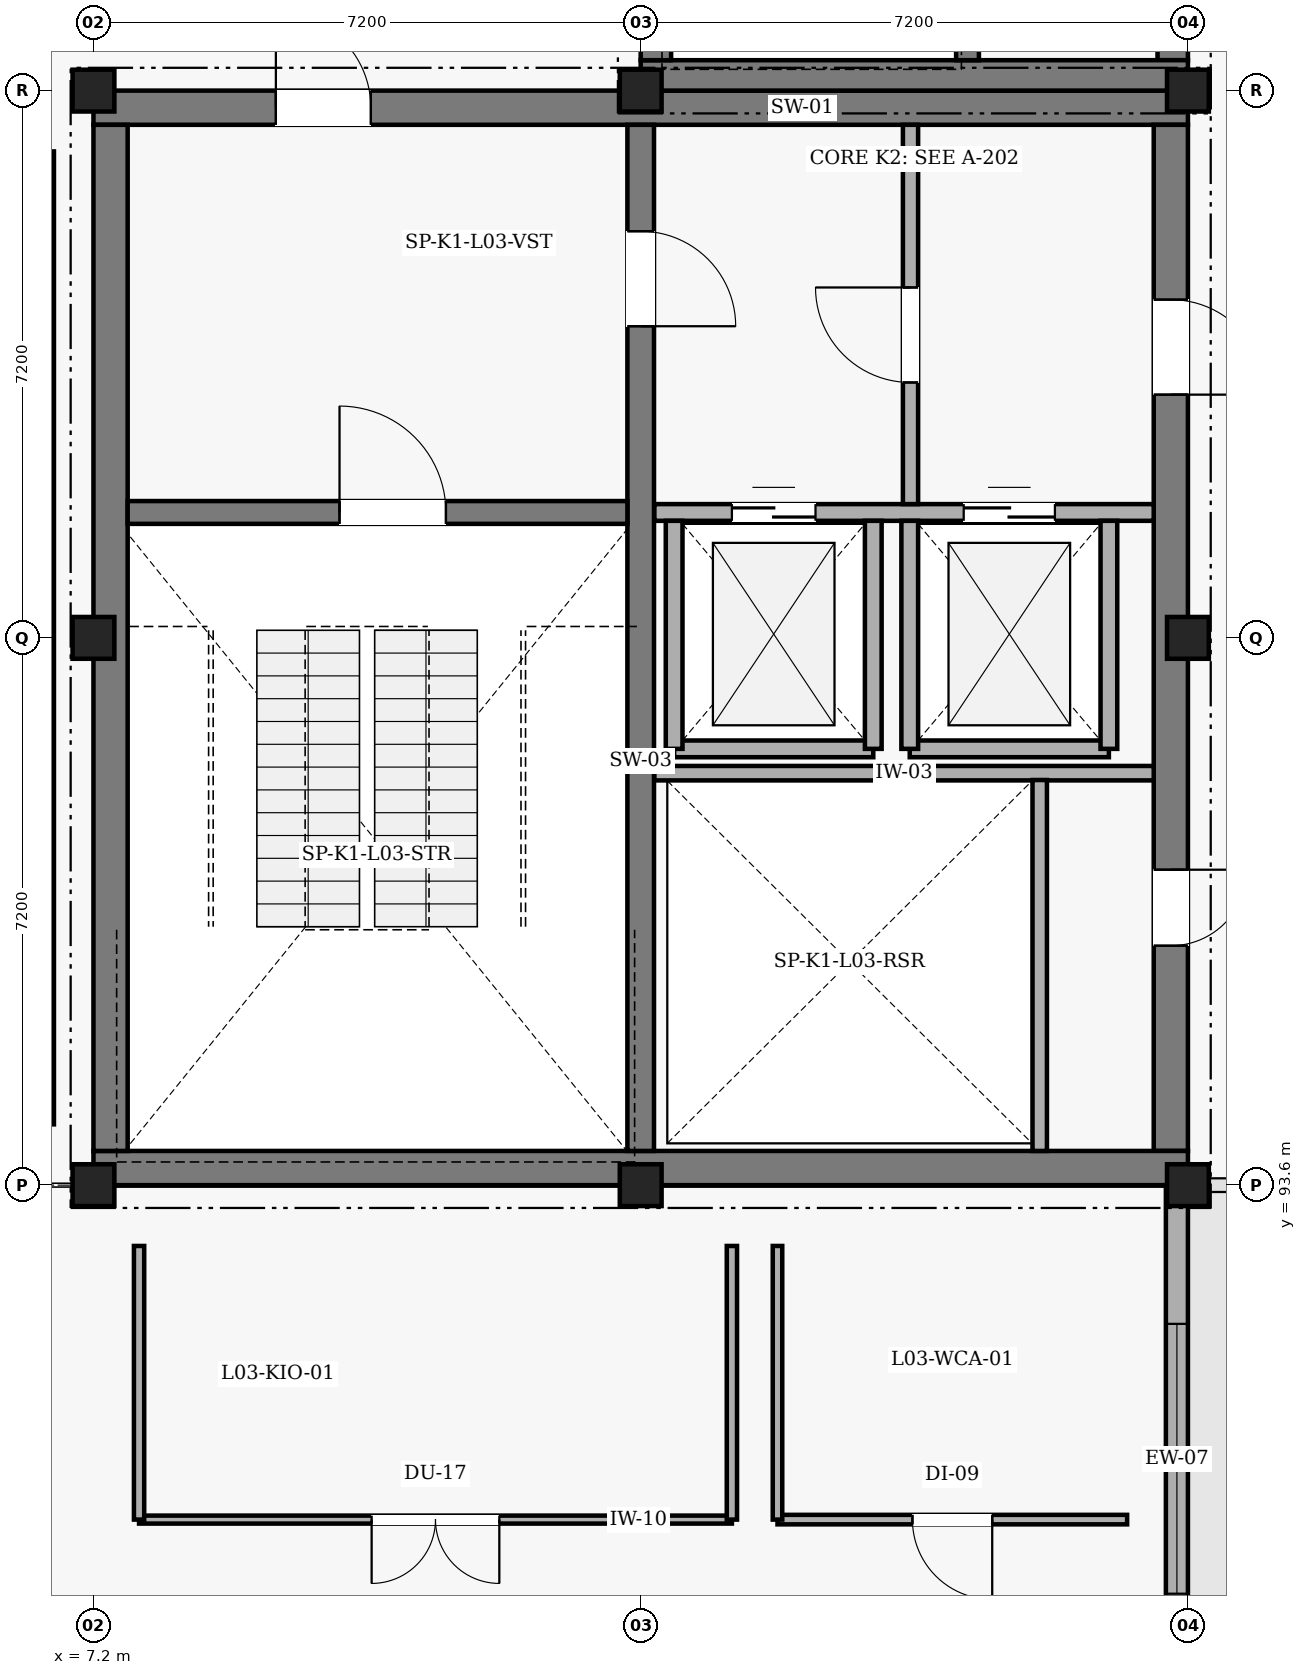
"""IFC4 building model, lengths in metres.
Left out: names, types, materials, properties, quantities, classifications, styles, units other than length and angle.
Written with IfcOpenShell. Run it as: python <this file> out.ifc"""

import sys

from ifc_helpers import new_model, si_unit, direction, frame, frame_2d, origin, origin_2d, place, context, subcontext, project, spatial, rectangle, extrude, element, fill, save


model = new_model("IFC4")
c1 = context("Model", 3, precision=1e-05, world=origin(), true_north=direction((0.0, 1.0)))
c2 = subcontext(c1, "Body", "Model", "MODEL_VIEW")
j1 = project(units=[si_unit("LENGTHUNIT", "METRE"), si_unit("PLANEANGLEUNIT", "RADIAN")], contexts=[c1])
p1 = place(None, origin())
s1 = spatial("IfcSite", under=j1, at=p1, CompositionType="ELEMENT")
p2 = place(p1, origin())
s2 = spatial("IfcBuilding", under=s1, at=p2, CompositionType="ELEMENT")
p3 = place(p2, frame((0.0, 0.0, 13.8)))
s3 = spatial("IfcBuildingStorey", under=s2, at=p3, CompositionType="ELEMENT", Elevation=13.8)
p4 = place(p3, frame((7.2, 107.775, 0.0), z_axis=(0.0, 0.0, 1.0), x_axis=(1.0, 0.0, 0.0)))
e1 = element("IfcWall", 1, at=p4, inside=s3, PredefinedType="SHEAR", context=c2, shape_type="SweptSolid", body=[
    extrude(rectangle(XDim=14.4, YDim=0.45, at=frame_2d((7.2, 0.0))), origin(), (0.0, 0.0, 1.0), 4.2),
])
p5 = place(p4, frame((2.4, 0.0, 0.0)))
e2 = element("IfcOpeningElement", 2, at=p5, cuts=e1, PredefinedType="OPENING", context=c2, shape_type="SweptSolid", body=[
    extrude(rectangle(XDim=1.25, YDim=2.2, at=frame_2d((0.625, 1.1))), frame((0.0, 0.235, 0.0), z_axis=(0.0, -1.0, 0.0), x_axis=(1.0, 0.0, 0.0)), (0.0, 0.0, 1.0), 0.47),
])
p6 = place(p3, frame((21.375, 107.55, 0.0), z_axis=(0.0, 0.0, 1.0), x_axis=(0.0, -1.0, 0.0)))
e3 = element("IfcWall", 3, at=p6, inside=s3, PredefinedType="SHEAR", context=c2, shape_type="SweptSolid", body=[
    extrude(rectangle(XDim=13.5, YDim=0.45, at=frame_2d((6.75, 0.0))), origin(), (0.0, 0.0, 1.0), 4.2),
])
p7 = place(p6, frame((9.8, 0.0, 0.0)))
e4 = element("IfcOpeningElement", 4, at=p7, cuts=e3, PredefinedType="OPENING", context=c2, shape_type="SweptSolid", body=[
    extrude(rectangle(XDim=1.0, YDim=2.15, at=frame_2d((0.5, 1.075))), frame((0.0, 0.235, 0.0), z_axis=(0.0, -1.0, 0.0), x_axis=(1.0, 0.0, 0.0)), (0.0, 0.0, 1.0), 0.47),
])
p8 = place(p6, frame((2.3, 0.0, 0.0)))
e5 = element("IfcOpeningElement", 5, at=p8, cuts=e3, PredefinedType="OPENING", context=c2, shape_type="SweptSolid", body=[
    extrude(rectangle(XDim=1.25, YDim=2.2, at=frame_2d((0.625, 1.1))), frame((0.0, 0.235, 0.0), z_axis=(0.0, -1.0, 0.0), x_axis=(1.0, 0.0, 0.0)), (0.0, 0.0, 1.0), 0.47),
])
p9 = place(p3, frame((21.6, 93.825, 0.0), z_axis=(0.0, 0.0, 1.0), x_axis=(-1.0, 0.0, 0.0)))
e6 = element("IfcWall", 6, at=p9, inside=s3, PredefinedType="SHEAR", context=c2, shape_type="SweptSolid", body=[
    extrude(rectangle(XDim=14.4, YDim=0.45, at=frame_2d((7.2, 0.0))), origin(), (0.0, 0.0, 1.0), 4.2),
])
p10 = place(p3, frame((7.425, 94.05, 0.0), z_axis=(0.0, 0.0, 1.0), x_axis=(0.0, 1.0, 0.0)))
e7 = element("IfcWall", 7, at=p10, inside=s3, PredefinedType="SHEAR", context=c2, shape_type="SweptSolid", body=[
    extrude(rectangle(XDim=13.5, YDim=0.45, at=frame_2d((6.75, 0.0))), origin(), (0.0, 0.0, 1.0), 4.2),
])
p11 = place(p3, frame((14.4, 107.55, 0.0), z_axis=(0.0, 0.0, 1.0), x_axis=(0.0, -1.0, 0.0)))
e8 = element("IfcWall", 8, at=p11, inside=s3, PredefinedType="SHEAR", context=c2, shape_type="SweptSolid", body=[
    extrude(rectangle(XDim=13.5, YDim=0.35, at=frame_2d((6.75, 0.0))), origin(), (0.0, 0.0, 1.0), 4.2),
])
p12 = place(p11, frame((1.4, 0.0, 0.0)))
e9 = element("IfcOpeningElement", 9, at=p12, cuts=e8, PredefinedType="OPENING", context=c2, shape_type="SweptSolid", body=[
    extrude(rectangle(XDim=1.25, YDim=2.2, at=frame_2d((0.625, 1.1))), frame((0.0, 0.185, 0.0), z_axis=(0.0, -1.0, 0.0), x_axis=(1.0, 0.0, 0.0)), (0.0, 0.0, 1.0), 0.37),
])
p13 = place(p3, frame((7.65, 102.45, 0.0), z_axis=(0.0, 0.0, 1.0), x_axis=(1.0, 0.0, 0.0)))
e10 = element("IfcWall", 10, at=p13, inside=s3, PredefinedType="SHEAR", context=c2, shape_type="SweptSolid", body=[
    extrude(rectangle(XDim=6.575, YDim=0.3, at=frame_2d((3.288, 0.0))), origin(), (0.0, 0.0, 1.0), 4.2),
])
p14 = place(p13, frame((2.788, 0.0, 0.0)))
e11 = element("IfcOpeningElement", 11, at=p14, cuts=e10, PredefinedType="OPENING", context=c2, shape_type="SweptSolid", body=[
    extrude(rectangle(XDim=1.4, YDim=2.2, at=frame_2d((0.7, 1.1))), frame((0.0, 0.16, 0.0), z_axis=(0.0, -1.0, 0.0), x_axis=(1.0, 0.0, 0.0)), (0.0, 0.0, 1.0), 0.32),
])
p15 = place(p3, frame((21.4, 122.0, 0.0), z_axis=(0.0, 0.0, 1.0), x_axis=(0.0, -1.0, 0.0)))
e12 = element("IfcWall", 12, at=p15, inside=s3, PredefinedType="SHEAR", context=c2, shape_type="SweptSolid", body=[
    extrude(rectangle(XDim=13.6, YDim=0.4, at=frame_2d((6.8, 0.0))), origin(), (0.0, 0.0, 1.0), 4.2),
])
p16 = place(p15, frame((2.3, 0.0, 0.0)))
e13 = element("IfcOpeningElement", 13, at=p16, cuts=e12, PredefinedType="OPENING", context=c2, shape_type="SweptSolid", body=[
    extrude(rectangle(XDim=1.25, YDim=2.2, at=frame_2d((0.625, 1.1))), frame((0.0, 0.21, 0.0), z_axis=(0.0, -1.0, 0.0), x_axis=(1.0, 0.0, 0.0)), (0.0, 0.0, 1.0), 0.42),
])
p17 = place(p3, frame((21.6, 108.2, 0.0), z_axis=(0.0, 0.0, 1.0), x_axis=(-1.0, 0.0, 0.0)))
e14 = element("IfcWall", 14, at=p17, inside=s3, PredefinedType="SHEAR", context=c2, shape_type="SweptSolid", body=[
    extrude(rectangle(XDim=7.2, YDim=0.4, at=frame_2d((3.6, 0.0))), origin(), (0.0, 0.0, 1.0), 4.2),
])
p18 = place(p3, frame((14.6, 108.4, 0.0), z_axis=(0.0, 0.0, 1.0), x_axis=(0.0, 1.0, 0.0)))
e15 = element("IfcWall", 15, at=p18, inside=s3, PredefinedType="SHEAR", context=c2, shape_type="SweptSolid", body=[
    extrude(rectangle(XDim=13.6, YDim=0.4, at=frame_2d((6.8, 0.0))), origin(), (0.0, 0.0, 1.0), 4.2),
])
p19 = place(p18, frame((9.8, 0.0, 0.0)))
e16 = element("IfcOpeningElement", 16, at=p19, cuts=e15, PredefinedType="OPENING", context=c2, shape_type="SweptSolid", body=[
    extrude(rectangle(XDim=1.25, YDim=2.2, at=frame_2d((0.625, 1.1))), frame((0.0, 0.21, 0.0), z_axis=(0.0, -1.0, 0.0), x_axis=(1.0, 0.0, 0.0)), (0.0, 0.0, 1.0), 0.42),
])
p20 = place(p3, frame((18.7, 116.7, 0.0), z_axis=(0.0, 0.0, 1.0), x_axis=(0.0, -1.0, 0.0)))
e17 = element("IfcWall", 17, at=p20, inside=s3, PredefinedType="SHEAR", context=c2, shape_type="SweptSolid", body=[
    extrude(rectangle(XDim=8.3, YDim=0.3, at=frame_2d((4.15, 0.0))), origin(), (0.0, 0.0, 1.0), 4.2),
])
for number, where, z_axis, x_axis in (
    (18, (7.2, 93.6, 0.0), (0.0, 0.0, 1.0), (1.0, 0.0, 0.0)),
    (19, (7.2, 100.8, 0.0), (0.0, 0.0, 1.0), (1.0, 0.0, 0.0)),
    (20, (7.2, 108.0, 0.0), (0.0, 0.0, 1.0), (1.0, 0.0, 0.0)),
    (21, (14.4, 93.6, 0.0), (0.0, 0.0, 1.0), (1.0, 0.0, 0.0)),
    (22, (14.4, 108.0, 0.0), (0.0, 0.0, 1.0), (1.0, 0.0, 0.0)),
    (23, (21.6, 93.6, 0.0), (0.0, 0.0, 1.0), (1.0, 0.0, 0.0)),
    (24, (21.6, 100.8, 0.0), (0.0, 0.0, 1.0), (1.0, 0.0, 0.0)),
    (25, (21.6, 108.0, 0.0), (0.0, 0.0, 1.0), (1.0, 0.0, 0.0)),
):
    element("IfcColumn", number, at=place(p3, frame(where, z_axis=z_axis, x_axis=x_axis)), inside=s3, PredefinedType="COLUMN", context=c2, shape_type="SweptSolid", body=[
        extrude(rectangle(XDim=0.55, YDim=0.55, at=origin_2d()), origin(), (0.0, 0.0, 1.0), 3.9),
    ])
p21 = place(p3, frame((21.455, 93.6, 0.0), z_axis=(0.0, 0.0, 1.0), x_axis=(0.0, -1.0, 0.0)))
e26 = element("IfcWall", 26, at=p21, inside=s3, PredefinedType="SOLIDWALL", context=c2, shape_type="SweptSolid", body=[
    extrude(rectangle(XDim=7.2, YDim=0.29, at=frame_2d((3.6, 0.0))), origin(), (0.0, 0.0, 1.0), 3.68),
])
p22 = place(p21, frame((1.825, 0.0, 0.9)))
e27 = element("IfcOpeningElement", 27, at=p22, cuts=e26, PredefinedType="OPENING", context=c2, shape_type="SweptSolid", body=[
    extrude(rectangle(XDim=3.55, YDim=1.65, at=frame_2d((1.775, 0.825))), frame((0.0, 0.155, 0.0), z_axis=(0.0, -1.0, 0.0), x_axis=(1.0, 0.0, 0.0)), (0.0, 0.0, 1.0), 0.31),
])
p23 = place(p3, frame((14.58, 99.02, 0.0), z_axis=(0.0, 0.0, 1.0), x_axis=(1.0, 0.0, 0.0)))
e28 = element("IfcWall", 28, at=p23, inside=s3, PredefinedType="PARTITIONING", context=c2, shape_type="SweptSolid", body=[
    extrude(rectangle(XDim=6.57, YDim=0.19, at=frame_2d((3.285, 0.0))), origin(), (0.0, 0.0, 1.0), 3.85),
])
p24 = place(p3, frame((19.65, 94.05, 0.0), z_axis=(0.0, 0.0, 1.0), x_axis=(0.0, 1.0, 0.0)))
e29 = element("IfcWall", 29, at=p24, inside=s3, PredefinedType="PARTITIONING", context=c2, shape_type="SweptSolid", body=[
    extrude(rectangle(XDim=4.88, YDim=0.19, at=frame_2d((2.44, 0.0))), origin(), (0.0, 0.0, 1.0), 3.85),
])
p25 = place(p3, frame((14.58, 102.45, 0.0), z_axis=(0.0, 0.0, 1.0), x_axis=(1.0, 0.0, 0.0)))
e30 = element("IfcWall", 30, at=p25, inside=s3, PredefinedType="PARTITIONING", context=c2, shape_type="SweptSolid", body=[
    extrude(rectangle(XDim=6.57, YDim=0.22, at=frame_2d((3.285, 0.0))), origin(), (0.0, 0.0, 1.0), 3.85),
])
p26 = place(p25, frame((1.02, 0.0, 0.0)))
e31 = element("IfcOpeningElement", 31, at=p26, cuts=e30, PredefinedType="OPENING", context=c2, shape_type="SweptSolid", body=[
    extrude(rectangle(XDim=1.1, YDim=2.15, at=frame_2d((0.55, 1.075))), frame((0.0, 0.12, 0.0), z_axis=(0.0, -1.0, 0.0), x_axis=(1.0, 0.0, 0.0)), (0.0, 0.0, 1.0), 0.24),
])
p27 = place(p25, frame((4.07, 0.0, 0.0)))
e32 = element("IfcOpeningElement", 32, at=p27, cuts=e30, PredefinedType="OPENING", context=c2, shape_type="SweptSolid", body=[
    extrude(rectangle(XDim=1.2, YDim=2.15, at=frame_2d((0.6, 1.075))), frame((0.0, 0.12, 0.0), z_axis=(0.0, -1.0, 0.0), x_axis=(1.0, 0.0, 0.0)), (0.0, 0.0, 1.0), 0.24),
])
p28 = place(p3, frame((14.84, 99.34, 0.0), z_axis=(0.0, 0.0, 1.0), x_axis=(1.0, 0.0, 0.0)))
e33 = element("IfcWall", 33, at=p28, inside=s3, PredefinedType="PARTITIONING", context=c2, shape_type="SweptSolid", body=[
    extrude(rectangle(XDim=2.62, YDim=0.22, at=frame_2d((1.31, 0.0))), origin(), (0.0, 0.0, 1.0), 3.85),
])
for number, where, z_axis, x_axis in (
    (34, (14.84, 99.34, 0.0), (0.0, 0.0, 1.0), (0.0, 1.0, 0.0)),
    (35, (17.46, 99.34, 0.0), (0.0, 0.0, 1.0), (0.0, 1.0, 0.0)),
):
    element("IfcWall", number, at=place(p3, frame(where, z_axis=z_axis, x_axis=x_axis)), inside=s3, PredefinedType="PARTITIONING", context=c2, shape_type="SweptSolid", body=[
        extrude(rectangle(XDim=3.0, YDim=0.22, at=frame_2d((1.5, 0.0))), origin(), (0.0, 0.0, 1.0), 3.85),
    ])
p29 = place(p3, frame((17.94, 99.34, 0.0), z_axis=(0.0, 0.0, 1.0), x_axis=(1.0, 0.0, 0.0)))
e36 = element("IfcWall", 36, at=p29, inside=s3, PredefinedType="PARTITIONING", context=c2, shape_type="SweptSolid", body=[
    extrude(rectangle(XDim=2.62, YDim=0.22, at=frame_2d((1.31, 0.0))), origin(), (0.0, 0.0, 1.0), 3.85),
])
for number, where, z_axis, x_axis in (
    (37, (17.94, 99.34, 0.0), (0.0, 0.0, 1.0), (0.0, 1.0, 0.0)),
    (38, (20.56, 99.34, 0.0), (0.0, 0.0, 1.0), (0.0, 1.0, 0.0)),
):
    element("IfcWall", number, at=place(p3, frame(where, z_axis=z_axis, x_axis=x_axis)), inside=s3, PredefinedType="PARTITIONING", context=c2, shape_type="SweptSolid", body=[
        extrude(rectangle(XDim=3.0, YDim=0.22, at=frame_2d((1.5, 0.0))), origin(), (0.0, 0.0, 1.0), 3.85),
    ])
p30 = place(p3, frame((17.95, 102.56, 0.0), z_axis=(0.0, 0.0, 1.0), x_axis=(0.0, 1.0, 0.0)))
e39 = element("IfcWall", 39, at=p30, inside=s3, PredefinedType="PARTITIONING", context=c2, shape_type="SweptSolid", body=[
    extrude(rectangle(XDim=4.99, YDim=0.2, at=frame_2d((2.495, 0.0))), origin(), (0.0, 0.0, 1.0), 3.85),
])
p31 = place(p30, frame((1.6, 0.0, 0.0)))
e40 = element("IfcOpeningElement", 40, at=p31, cuts=e39, PredefinedType="OPENING", context=c2, shape_type="SweptSolid", body=[
    extrude(rectangle(XDim=1.25, YDim=2.2, at=frame_2d((0.625, 1.1))), frame((0.0, 0.11, 0.0), z_axis=(0.0, -1.0, 0.0), x_axis=(1.0, 0.0, 0.0)), (0.0, 0.0, 1.0), 0.22),
])
p32 = place(p3, frame((15.6, 89.2, 0.0), z_axis=(0.0, 0.0, 1.0), x_axis=(-1.0, 0.0, 0.0)))
e41 = element("IfcWall", 41, at=p32, inside=s3, PredefinedType="PARTITIONING", context=c2, shape_type="SweptSolid", body=[
    extrude(rectangle(XDim=7.8, YDim=0.105, at=frame_2d((3.9, 0.0))), origin(), (0.0, 0.0, 1.0), 3.58),
])
p33 = place(p32, frame((3.06, 0.0, 0.0)))
e42 = element("IfcOpeningElement", 42, at=p33, cuts=e41, PredefinedType="OPENING", context=c2, shape_type="SweptSolid", body=[
    extrude(rectangle(XDim=1.68, YDim=2.28, at=frame_2d((0.84, 1.14))), frame((0.0, 0.062, 0.0), z_axis=(0.0, -1.0, 0.0), x_axis=(1.0, 0.0, 0.0)), (0.0, 0.0, 1.0), 0.125),
])
for number, where, z_axis, x_axis in (
    (43, (15.6, 92.8, 0.0), (0.0, 0.0, 1.0), (0.0, -1.0, 0.0)),
    (44, (7.8, 89.2, 0.0), (0.0, 0.0, 1.0), (0.0, 1.0, 0.0)),
):
    element("IfcWall", number, at=place(p3, frame(where, z_axis=z_axis, x_axis=x_axis)), inside=s3, PredefinedType="PARTITIONING", context=c2, shape_type="SweptSolid", body=[
        extrude(rectangle(XDim=3.6, YDim=0.135, at=frame_2d((1.8, 0.0))), origin(), (0.0, 0.0, 1.0), 3.71),
    ])
p34 = place(p3, frame((20.8, 89.2, 0.0), z_axis=(0.0, 0.0, 1.0), x_axis=(-1.0, 0.0, 0.0)))
e45 = element("IfcWall", 45, at=p34, inside=s3, PredefinedType="PARTITIONING", context=c2, shape_type="SweptSolid", body=[
    extrude(rectangle(XDim=4.6, YDim=0.125, at=frame_2d((2.3, 0.0))), origin(), (0.0, 0.0, 1.0), 3.85),
])
p35 = place(p34, frame((1.775, 0.0, 0.0)))
e46 = element("IfcOpeningElement", 46, at=p35, cuts=e45, PredefinedType="OPENING", context=c2, shape_type="SweptSolid", body=[
    extrude(rectangle(XDim=1.05, YDim=2.1, at=frame_2d((0.525, 1.05))), frame((0.0, 0.073, 0.0), z_axis=(0.0, -1.0, 0.0), x_axis=(1.0, 0.0, 0.0)), (0.0, 0.0, 1.0), 0.145),
])
p36 = place(p3, frame((16.2, 89.2, 0.0), z_axis=(0.0, 0.0, 1.0), x_axis=(0.0, 1.0, 0.0)))
e47 = element("IfcWall", 47, at=p36, inside=s3, PredefinedType="PARTITIONING", context=c2, shape_type="SweptSolid", body=[
    extrude(rectangle(XDim=3.6, YDim=0.125, at=frame_2d((1.8, 0.0))), origin(), (0.0, 0.0, 1.0), 3.71),
])
p37 = place(p3, frame((6.6, 107.2, 0.0), z_axis=(0.0, 0.0, 1.0), x_axis=(0.0, -1.0, 0.0)))
e48 = element("IfcWall", 48, at=p37, inside=s3, PredefinedType="PARTITIONING", context=c2, shape_type="SweptSolid", body=[
    extrude(rectangle(XDim=12.8, YDim=0.16, at=frame_2d((6.4, 0.0))), origin(), (0.0, 0.0, 1.0), 3.45),
])
p38 = place(p22, origin())
e49 = element("IfcWindow", 49, at=p38, inside=s3, PartitioningType="SINGLE_PANEL", PredefinedType="WINDOW", context=c2, shape_type="SweptSolid", body=[
    extrude(rectangle(XDim=3.55, YDim=1.65, at=frame_2d((1.775, 0.825))), frame((0.0, 0.03, 0.0), z_axis=(0.0, -1.0, 0.0), x_axis=(1.0, 0.0, 0.0)), (0.0, 0.0, 1.0), 0.06),
])
fill(e27, e49)
p39 = place(p14, origin())
e50 = element("IfcDoor", 50, at=p39, inside=s3, OperationType="SINGLE_SWING_LEFT", PredefinedType="DOOR", context=c2, shape_type="SweptSolid", body=[
    extrude(rectangle(XDim=1.4, YDim=2.2, at=frame_2d((0.7, 1.1))), frame((0.0, 0.025, 0.0), z_axis=(0.0, -1.0, 0.0), x_axis=(1.0, 0.0, 0.0)), (0.0, 0.0, 1.0), 0.05),
])
fill(e11, e50)
p40 = place(p12, origin())
e51 = element("IfcDoor", 51, at=p40, inside=s3, OperationType="SINGLE_SWING_RIGHT", PredefinedType="DOOR", context=c2, shape_type="SweptSolid", body=[
    extrude(rectangle(XDim=1.25, YDim=2.2, at=frame_2d((0.625, 1.1))), frame((0.0, 0.025, 0.0), z_axis=(0.0, -1.0, 0.0), x_axis=(1.0, 0.0, 0.0)), (0.0, 0.0, 1.0), 0.05),
])
fill(e9, e51)
p41 = place(p7, origin())
e52 = element("IfcDoor", 52, at=p41, inside=s3, OperationType="SINGLE_SWING_LEFT", PredefinedType="DOOR", context=c2, shape_type="SweptSolid", body=[
    extrude(rectangle(XDim=1.0, YDim=2.15, at=frame_2d((0.5, 1.075))), frame((0.0, 0.025, 0.0), z_axis=(0.0, -1.0, 0.0), x_axis=(1.0, 0.0, 0.0)), (0.0, 0.0, 1.0), 0.05),
])
fill(e4, e52)
p42 = place(p26, origin())
e53 = element("IfcDoor", 53, at=p42, inside=s3, OperationType="DOUBLE_DOOR_SLIDING", PredefinedType="DOOR", context=c2, shape_type="SweptSolid", body=[
    extrude(rectangle(XDim=1.1, YDim=2.15, at=frame_2d((0.55, 1.075))), frame((0.0, 0.025, 0.0), z_axis=(0.0, -1.0, 0.0), x_axis=(1.0, 0.0, 0.0)), (0.0, 0.0, 1.0), 0.05),
])
fill(e31, e53)
p43 = place(p27, origin())
e54 = element("IfcDoor", 54, at=p43, inside=s3, OperationType="DOUBLE_DOOR_SLIDING", PredefinedType="DOOR", context=c2, shape_type="SweptSolid", body=[
    extrude(rectangle(XDim=1.2, YDim=2.15, at=frame_2d((0.6, 1.075))), frame((0.0, 0.025, 0.0), z_axis=(0.0, -1.0, 0.0), x_axis=(1.0, 0.0, 0.0)), (0.0, 0.0, 1.0), 0.05),
])
fill(e32, e54)
p44 = place(p31, origin())
e55 = element("IfcDoor", 55, at=p44, inside=s3, OperationType="SINGLE_SWING_RIGHT", PredefinedType="DOOR", context=c2, shape_type="SweptSolid", body=[
    extrude(rectangle(XDim=1.25, YDim=2.2, at=frame_2d((0.625, 1.1))), frame((0.0, 0.025, 0.0), z_axis=(0.0, -1.0, 0.0), x_axis=(1.0, 0.0, 0.0)), (0.0, 0.0, 1.0), 0.05),
])
fill(e40, e55)
p45 = place(p5, origin())
e56 = element("IfcDoor", 56, at=p45, inside=s3, OperationType="SINGLE_SWING_LEFT", PredefinedType="DOOR", context=c2, shape_type="SweptSolid", body=[
    extrude(rectangle(XDim=1.25, YDim=2.2, at=frame_2d((0.625, 1.1))), frame((0.0, 0.025, 0.0), z_axis=(0.0, -1.0, 0.0), x_axis=(1.0, 0.0, 0.0)), (0.0, 0.0, 1.0), 0.05),
])
fill(e2, e56)
p46 = place(p8, origin())
e57 = element("IfcDoor", 57, at=p46, inside=s3, OperationType="SINGLE_SWING_RIGHT", PredefinedType="DOOR", context=c2, shape_type="SweptSolid", body=[
    extrude(rectangle(XDim=1.25, YDim=2.2, at=frame_2d((0.625, 1.1))), frame((0.0, 0.025, 0.0), z_axis=(0.0, -1.0, 0.0), x_axis=(1.0, 0.0, 0.0)), (0.0, 0.0, 1.0), 0.05),
])
fill(e5, e57)
p47 = place(p33, origin())
e58 = element("IfcDoor", 58, at=p47, inside=s3, OperationType="DOUBLE_DOOR_SINGLE_SWING", PredefinedType="DOOR", context=c2, shape_type="SweptSolid", body=[
    extrude(rectangle(XDim=1.68, YDim=2.28, at=frame_2d((0.84, 1.14))), frame((0.0, 0.025, 0.0), z_axis=(0.0, -1.0, 0.0), x_axis=(1.0, 0.0, 0.0)), (0.0, 0.0, 1.0), 0.05),
])
fill(e42, e58)
p48 = place(p35, origin())
e59 = element("IfcDoor", 59, at=p48, inside=s3, OperationType="SINGLE_SWING_LEFT", PredefinedType="DOOR", context=c2, shape_type="SweptSolid", body=[
    extrude(rectangle(XDim=1.05, YDim=2.1, at=frame_2d((0.525, 1.05))), frame((0.0, 0.025, 0.0), z_axis=(0.0, -1.0, 0.0), x_axis=(1.0, 0.0, 0.0)), (0.0, 0.0, 1.0), 0.05),
])
fill(e46, e59)
save(model, sys.argv[1])
